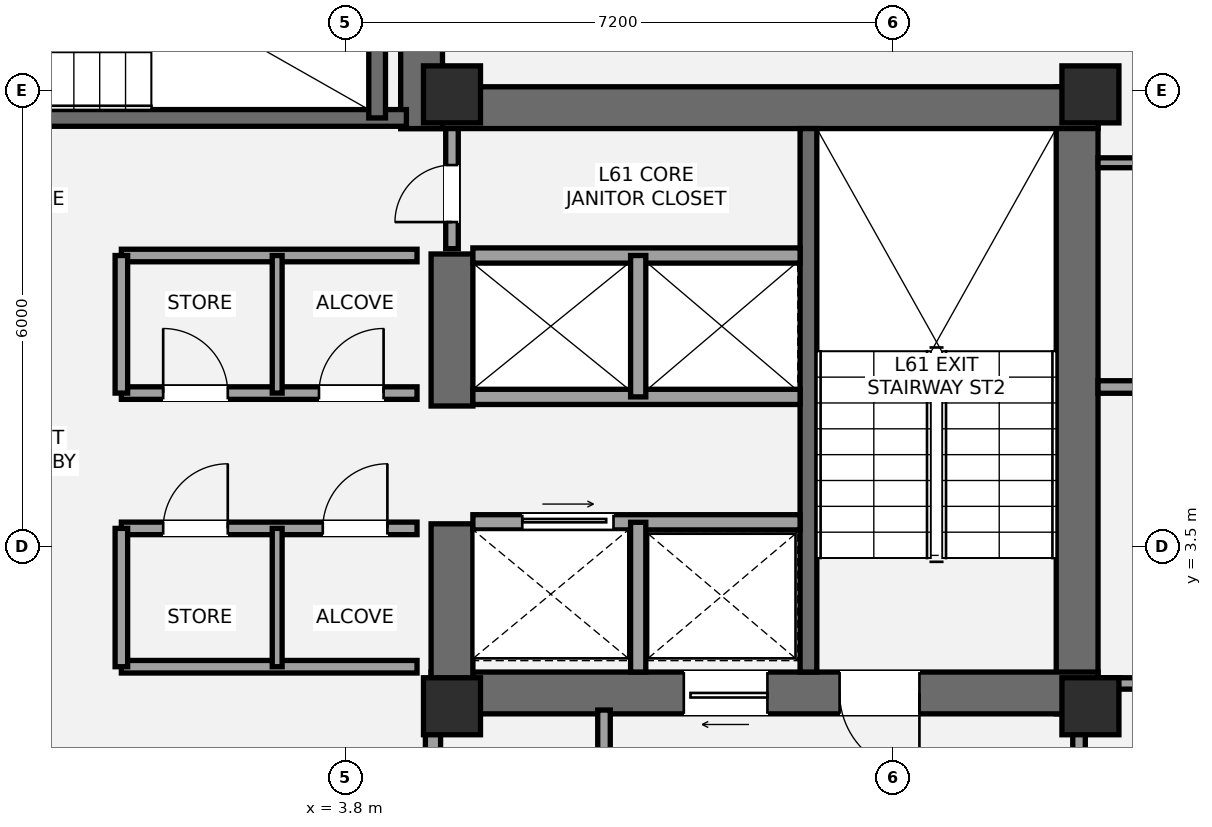
"""IFC4 building model, lengths in metres.
Left out: names, types, materials, properties, quantities, classifications, styles, units other than length and angle.
Written with IfcOpenShell. Run it as: python <this file> out.ifc"""

import sys

from ifc_helpers import new_model, si_unit, direction, frame, frame_2d, origin, origin_2d, place, context, subcontext, project, spatial, rectangle, extrude, element, fill, save


model = new_model("IFC4")
c1 = context("Model", 3, precision=1e-05, world=origin(), true_north=direction((0.0, 1.0)))
c2 = subcontext(c1, "Body", "Model", "MODEL_VIEW")
j1 = project(units=[si_unit("LENGTHUNIT", "METRE"), si_unit("PLANEANGLEUNIT", "RADIAN")], contexts=[c1])
p1 = place(None, origin())
s1 = spatial("IfcSite", under=j1, at=p1, CompositionType="ELEMENT")
p2 = place(p1, origin())
s2 = spatial("IfcBuilding", under=s1, at=p2, CompositionType="ELEMENT")
p3 = place(p2, frame((0.0, 0.0, 219.45)))
s3 = spatial("IfcBuildingStorey", under=s2, at=p3, CompositionType="ELEMENT", Elevation=219.45)
p4 = place(p3, frame((13.425, 1.3, 0.0), z_axis=(0.0, 0.0, 1.0), x_axis=(0.0, 1.0, 0.0)))
e1 = element("IfcWall", 1, at=p4, inside=s3, PredefinedType="SHEAR", context=c2, shape_type="SweptSolid", body=[
    extrude(rectangle(XDim=8.25, YDim=0.55, at=frame_2d((4.125, 0.0))), origin(), (0.0, 0.0, 1.0), 3.15),
])
p5 = place(p3, frame((4.525, 9.275, 0.0), z_axis=(0.0, 0.0, 1.0), x_axis=(1.0, 0.0, 0.0)))
e2 = element("IfcWall", 2, at=p5, inside=s3, PredefinedType="SHEAR", context=c2, shape_type="SweptSolid", body=[
    extrude(rectangle(XDim=9.175, YDim=0.55, at=frame_2d((4.587, 0.0))), origin(), (0.0, 0.0, 1.0), 3.15),
])
p6 = place(p3, frame((13.7, 1.575, 0.0), z_axis=(0.0, 0.0, 1.0), x_axis=(-1.0, 0.0, 0.0)))
e3 = element("IfcWall", 3, at=p6, inside=s3, PredefinedType="SHEAR", context=c2, shape_type="SweptSolid", body=[
    extrude(rectangle(XDim=8.775, YDim=0.55, at=frame_2d((4.387, 0.0))), origin(), (0.0, 0.0, 1.0), 3.15),
])
p7 = place(p6, frame((2.35, 0.0, 0.0)))
e4 = element("IfcOpeningElement", 4, at=p7, cuts=e3, PredefinedType="OPENING", context=c2, shape_type="SweptSolid", body=[
    extrude(rectangle(XDim=1.05, YDim=2.15, at=frame_2d((0.525, 1.075))), frame((0.0, 0.285, 0.0), z_axis=(0.0, -1.0, 0.0), x_axis=(1.0, 0.0, 0.0)), (0.0, 0.0, 1.0), 0.57),
])
p8 = place(p6, frame((4.35, 0.0, 0.0)))
e5 = element("IfcOpeningElement", 5, at=p8, cuts=e3, PredefinedType="OPENING", context=c2, shape_type="SweptSolid", body=[
    extrude(rectangle(XDim=1.1, YDim=2.2, at=frame_2d((0.55, 1.1))), frame((0.0, 0.285, 0.0), z_axis=(0.0, -1.0, 0.0), x_axis=(1.0, 0.0, 0.0)), (0.0, 0.0, 1.0), 0.57),
])
p9 = place(p3, frame((5.2, 1.3, 0.0), z_axis=(0.0, 0.0, 1.0), x_axis=(0.0, 1.0, 0.0)))
e6 = element("IfcWall", 6, at=p9, inside=s3, PredefinedType="SHEAR", context=c2, shape_type="SweptSolid", body=[
    extrude(rectangle(XDim=2.5, YDim=0.55, at=frame_2d((1.25, 0.0))), origin(), (0.0, 0.0, 1.0), 3.15),
])
p10 = place(p3, frame((5.2, 5.35, 0.0), z_axis=(0.0, 0.0, 1.0), x_axis=(0.0, 1.0, 0.0)))
e7 = element("IfcWall", 7, at=p10, inside=s3, PredefinedType="SHEAR", context=c2, shape_type="SweptSolid", body=[
    extrude(rectangle(XDim=2.0, YDim=0.55, at=frame_2d((1.0, 0.0))), origin(), (0.0, 0.0, 1.0), 3.15),
])
p11 = place(p3, frame((9.89, 1.85, 0.0), z_axis=(0.0, 0.0, 1.0), x_axis=(0.0, 1.0, 0.0)))
e8 = element("IfcWall", 8, at=p11, inside=s3, PredefinedType="SHEAR", context=c2, shape_type="SweptSolid", body=[
    extrude(rectangle(XDim=7.15, YDim=0.22, at=frame_2d((3.575, 0.0))), origin(), (0.0, 0.0, 1.0), 3.15),
])
p12 = place(p3, frame((4.8, 9.0, 0.0), z_axis=(0.0, 0.0, 1.0), x_axis=(0.0, 1.0, 0.0)))
e9 = element("IfcWall", 9, at=p12, inside=s3, PredefinedType="SHEAR", context=c2, shape_type="SweptSolid", body=[
    extrude(rectangle(XDim=3.95, YDim=0.55, at=frame_2d((1.975, 0.0))), origin(), (0.0, 0.0, 1.0), 3.15),
])
p13 = place(p3, frame((-4.7, 9.14, 0.0), z_axis=(0.0, 0.0, 1.0), x_axis=(1.0, 0.0, 0.0)))
e10 = element("IfcWall", 10, at=p13, inside=s3, PredefinedType="SHEAR", context=c2, shape_type="SweptSolid", body=[
    extrude(rectangle(XDim=9.3, YDim=0.22, at=frame_2d((4.65, 0.0))), origin(), (0.0, 0.0, 1.0), 3.15),
])
p14 = place(p13, frame((1.15, 0.0, 0.0)))
e11 = element("IfcOpeningElement", 11, at=p14, cuts=e10, PredefinedType="OPENING", context=c2, shape_type="SweptSolid", body=[
    extrude(rectangle(XDim=1.05, YDim=2.15, at=frame_2d((0.525, 1.075))), frame((0.0, 0.12, 0.0), z_axis=(0.0, -1.0, 0.0), x_axis=(1.0, 0.0, 0.0)), (0.0, 0.0, 1.0), 0.24),
])
p15 = place(p3, frame((4.215, 9.14, 0.0), z_axis=(0.0, 0.0, 1.0), x_axis=(0.0, 1.0, 0.0)))
e12 = element("IfcWall", 12, at=p15, inside=s3, PredefinedType="SHEAR", context=c2, shape_type="SweptSolid", body=[
    extrude(rectangle(XDim=3.26, YDim=0.22, at=frame_2d((1.63, 0.0))), origin(), (0.0, 0.0, 1.0), 3.15),
])
for number, where, z_axis, x_axis in (
    (13, (5.2, 1.4, 0.0), (0.0, 0.0, 1.0), (1.0, 0.0, 0.0)),
    (14, (5.2, 9.45, 0.0), (0.0, 0.0, 1.0), (1.0, 0.0, 0.0)),
    (15, (13.6, 1.4, 0.0), (0.0, 0.0, 1.0), (1.0, 0.0, 0.0)),
    (16, (13.6, 9.45, 0.0), (0.0, 0.0, 1.0), (1.0, 0.0, 0.0)),
):
    element("IfcColumn", number, at=place(p3, frame(where, z_axis=z_axis, x_axis=x_axis)), inside=s3, PredefinedType="PILASTER", context=c2, shape_type="SweptSolid", body=[
        extrude(rectangle(XDim=0.75, YDim=0.75, at=origin_2d()), origin(), (0.0, 0.0, 1.0), 3.15),
    ])
p16 = place(p3, frame((13.991, 11.482, 0.0), z_axis=(0.0, 0.0, 1.0), x_axis=(0.827609463482, -0.56130435234, 0.0)))
e17 = element("IfcWall", 17, at=p16, inside=s3, PredefinedType="STANDARD", context=c2, shape_type="SweptSolid", body=[
    extrude(rectangle(XDim=3.727, YDim=0.44, at=frame_2d((1.863, 0.0))), origin(), (0.0, 0.0, 1.0), 2.336),
])
p17 = place(p16, frame((2.626, 0.0, 0.42)))
e18 = element("IfcOpeningElement", 18, at=p17, cuts=e17, PredefinedType="OPENING", context=c2, shape_type="SweptSolid", body=[
    extrude(rectangle(XDim=0.9, YDim=1.35, at=frame_2d((0.45, 0.675))), frame((0.0, 0.23, 0.0), z_axis=(0.0, -1.0, 0.0), x_axis=(1.0, 0.0, 0.0)), (0.0, 0.0, 1.0), 0.46),
])
p18 = place(p3, frame((7.2, -2.15, 0.0), z_axis=(0.0, 0.0, 1.0), x_axis=(0.0, 1.0, 0.0)))
e19 = element("IfcWall", 19, at=p18, inside=s3, PredefinedType="PARTITIONING", context=c2, shape_type="SweptSolid", body=[
    extrude(rectangle(XDim=3.5, YDim=0.165, at=frame_2d((1.75, 0.0))), origin(), (0.0, 0.0, 1.0), 2.423),
])
p19 = place(p3, frame((13.45, -2.15, 0.0), z_axis=(0.0, 0.0, 1.0), x_axis=(0.0, 1.0, 0.0)))
e20 = element("IfcWall", 20, at=p19, inside=s3, PredefinedType="PARTITIONING", context=c2, shape_type="SweptSolid", body=[
    extrude(rectangle(XDim=3.5, YDim=0.165, at=frame_2d((1.75, 0.0))), origin(), (0.0, 0.0, 1.0), 2.423),
])
p20 = place(p19, frame((0.67, 0.0, 0.0)))
e21 = element("IfcOpeningElement", 21, at=p20, cuts=e20, PredefinedType="OPENING", context=c2, shape_type="SweptSolid", body=[
    extrude(rectangle(XDim=1.05, YDim=2.15, at=frame_2d((0.525, 1.075))), frame((0.0, 0.093, 0.0), z_axis=(0.0, -1.0, 0.0), x_axis=(1.0, 0.0, 0.0)), (0.0, 0.0, 1.0), 0.185),
])
p21 = place(p3, frame((4.95, -2.15, 0.0), z_axis=(0.0, 0.0, 1.0), x_axis=(0.0, 1.0, 0.0)))
e22 = element("IfcWall", 22, at=p21, inside=s3, PredefinedType="SOLIDWALL", context=c2, shape_type="SweptSolid", body=[
    extrude(rectangle(XDim=3.5, YDim=0.2, at=frame_2d((1.75, 0.0))), origin(), (0.0, 0.0, 1.0), 2.423),
])
p22 = place(p21, frame((0.95, 0.0, 0.0)))
e23 = element("IfcOpeningElement", 23, at=p22, cuts=e22, PredefinedType="OPENING", context=c2, shape_type="SweptSolid", body=[
    extrude(rectangle(XDim=0.75, YDim=2.1, at=frame_2d((0.375, 1.05))), frame((0.0, 0.11, 0.0), z_axis=(0.0, -1.0, 0.0), x_axis=(1.0, 0.0, 0.0)), (0.0, 0.0, 1.0), 0.22),
])
p23 = place(p3, frame((5.475, 3.82, 0.0), z_axis=(0.0, 0.0, 1.0), x_axis=(1.0, 0.0, 0.0)))
e24 = element("IfcWall", 24, at=p23, inside=s3, PredefinedType="SOLIDWALL", context=c2, shape_type="SweptSolid", body=[
    extrude(rectangle(XDim=4.305, YDim=0.2, at=frame_2d((2.152, 0.0))), origin(), (0.0, 0.0, 1.0), 2.97),
])
p24 = place(p23, frame((0.65, 0.0, 0.0)))
e25 = element("IfcOpeningElement", 25, at=p24, cuts=e24, PredefinedType="OPENING", context=c2, shape_type="SweptSolid", body=[
    extrude(rectangle(XDim=1.2, YDim=2.2, at=frame_2d((0.6, 1.1))), frame((0.0, 0.11, 0.0), z_axis=(0.0, -1.0, 0.0), x_axis=(1.0, 0.0, 0.0)), (0.0, 0.0, 1.0), 0.22),
])
p25 = place(p3, frame((7.65, 1.85, 0.0), z_axis=(0.0, 0.0, 1.0), x_axis=(0.0, 1.0, 0.0)))
e26 = element("IfcWall", 26, at=p25, inside=s3, PredefinedType="SOLIDWALL", context=c2, shape_type="SweptSolid", body=[
    extrude(rectangle(XDim=1.97, YDim=0.2, at=frame_2d((0.985, 0.0))), origin(), (0.0, 0.0, 1.0), 2.97),
])
for number, where, z_axis, x_axis in (
    (27, (5.475, 5.47, 0.0), (0.0, 0.0, 1.0), (1.0, 0.0, 0.0)),
    (28, (5.475, 7.33, 0.0), (0.0, 0.0, 1.0), (1.0, 0.0, 0.0)),
):
    element("IfcWall", number, at=place(p3, frame(where, z_axis=z_axis, x_axis=x_axis)), inside=s3, PredefinedType="SOLIDWALL", context=c2, shape_type="SweptSolid", body=[
        extrude(rectangle(XDim=4.305, YDim=0.2, at=frame_2d((2.152, 0.0))), origin(), (0.0, 0.0, 1.0), 2.97),
    ])
p26 = place(p3, frame((7.65, 5.47, 0.0), z_axis=(0.0, 0.0, 1.0), x_axis=(0.0, 1.0, 0.0)))
e29 = element("IfcWall", 29, at=p26, inside=s3, PredefinedType="SOLIDWALL", context=c2, shape_type="SweptSolid", body=[
    extrude(rectangle(XDim=1.86, YDim=0.2, at=frame_2d((0.93, 0.0))), origin(), (0.0, 0.0, 1.0), 2.97),
])
p27 = place(p3, frame((0.85, 1.92, 0.0), z_axis=(0.0, 0.0, 1.0), x_axis=(1.0, 0.0, 0.0)))
e30 = element("IfcWall", 30, at=p27, inside=s3, PredefinedType="PARTITIONING", context=c2, shape_type="SweptSolid", body=[
    extrude(rectangle(XDim=3.89, YDim=0.165, at=frame_2d((1.945, 0.0))), origin(), (0.0, 0.0, 1.0), 2.11),
])
p28 = place(p3, frame((0.85, 3.74, 0.0), z_axis=(0.0, 0.0, 1.0), x_axis=(1.0, 0.0, 0.0)))
e31 = element("IfcWall", 31, at=p28, inside=s3, PredefinedType="PARTITIONING", context=c2, shape_type="SweptSolid", body=[
    extrude(rectangle(XDim=3.89, YDim=0.165, at=frame_2d((1.945, 0.0))), origin(), (0.0, 0.0, 1.0), 2.97),
])
p29 = place(p28, frame((0.55, 0.0, 0.0)))
e32 = element("IfcOpeningElement", 32, at=p29, cuts=e31, PredefinedType="OPENING", context=c2, shape_type="SweptSolid", body=[
    extrude(rectangle(XDim=0.85, YDim=2.1, at=frame_2d((0.425, 1.05))), frame((0.0, 0.093, 0.0), z_axis=(0.0, -1.0, 0.0), x_axis=(1.0, 0.0, 0.0)), (0.0, 0.0, 1.0), 0.185),
])
p30 = place(p28, frame((2.65, 0.0, 0.0)))
e33 = element("IfcOpeningElement", 33, at=p30, cuts=e31, PredefinedType="OPENING", context=c2, shape_type="SweptSolid", body=[
    extrude(rectangle(XDim=0.85, YDim=2.1, at=frame_2d((0.425, 1.05))), frame((0.0, 0.093, 0.0), z_axis=(0.0, -1.0, 0.0), x_axis=(1.0, 0.0, 0.0)), (0.0, 0.0, 1.0), 0.185),
])
p31 = place(p3, frame((0.85, 1.92, 0.0), z_axis=(0.0, 0.0, 1.0), x_axis=(0.0, 1.0, 0.0)))
e34 = element("IfcWall", 34, at=p31, inside=s3, PredefinedType="PARTITIONING", context=c2, shape_type="SweptSolid", body=[
    extrude(rectangle(XDim=1.82, YDim=0.165, at=frame_2d((0.91, 0.0))), origin(), (0.0, 0.0, 1.0), 2.97),
])
p32 = place(p3, frame((2.9, 1.92, 0.0), z_axis=(0.0, 0.0, 1.0), x_axis=(0.0, 1.0, 0.0)))
e35 = element("IfcWall", 35, at=p32, inside=s3, PredefinedType="PARTITIONING", context=c2, shape_type="SweptSolid", body=[
    extrude(rectangle(XDim=1.82, YDim=0.13, at=frame_2d((0.91, 0.0))), origin(), (0.0, 0.0, 1.0), 2.97),
])
p33 = place(p3, frame((0.85, 5.52, 0.0), z_axis=(0.0, 0.0, 1.0), x_axis=(1.0, 0.0, 0.0)))
e36 = element("IfcWall", 36, at=p33, inside=s3, PredefinedType="PARTITIONING", context=c2, shape_type="SweptSolid", body=[
    extrude(rectangle(XDim=3.89, YDim=0.165, at=frame_2d((1.945, 0.0))), origin(), (0.0, 0.0, 1.0), 2.97),
])
p34 = place(p33, frame((0.55, 0.0, 0.0)))
e37 = element("IfcOpeningElement", 37, at=p34, cuts=e36, PredefinedType="OPENING", context=c2, shape_type="SweptSolid", body=[
    extrude(rectangle(XDim=0.85, YDim=2.1, at=frame_2d((0.425, 1.05))), frame((0.0, 0.093, 0.0), z_axis=(0.0, -1.0, 0.0), x_axis=(1.0, 0.0, 0.0)), (0.0, 0.0, 1.0), 0.185),
])
p35 = place(p33, frame((2.6, 0.0, 0.0)))
e38 = element("IfcOpeningElement", 38, at=p35, cuts=e36, PredefinedType="OPENING", context=c2, shape_type="SweptSolid", body=[
    extrude(rectangle(XDim=0.85, YDim=2.1, at=frame_2d((0.425, 1.05))), frame((0.0, 0.093, 0.0), z_axis=(0.0, -1.0, 0.0), x_axis=(1.0, 0.0, 0.0)), (0.0, 0.0, 1.0), 0.185),
])
p36 = place(p3, frame((0.85, 7.33, 0.0), z_axis=(0.0, 0.0, 1.0), x_axis=(1.0, 0.0, 0.0)))
e39 = element("IfcWall", 39, at=p36, inside=s3, PredefinedType="PARTITIONING", context=c2, shape_type="SweptSolid", body=[
    extrude(rectangle(XDim=3.89, YDim=0.165, at=frame_2d((1.945, 0.0))), origin(), (0.0, 0.0, 1.0), 2.97),
])
p37 = place(p3, frame((0.85, 5.52, 0.0), z_axis=(0.0, 0.0, 1.0), x_axis=(0.0, 1.0, 0.0)))
e40 = element("IfcWall", 40, at=p37, inside=s3, PredefinedType="PARTITIONING", context=c2, shape_type="SweptSolid", body=[
    extrude(rectangle(XDim=1.81, YDim=0.165, at=frame_2d((0.905, 0.0))), origin(), (0.0, 0.0, 1.0), 2.97),
])
p38 = place(p3, frame((2.9, 5.52, 0.0), z_axis=(0.0, 0.0, 1.0), x_axis=(0.0, 1.0, 0.0)))
e41 = element("IfcWall", 41, at=p38, inside=s3, PredefinedType="PARTITIONING", context=c2, shape_type="SweptSolid", body=[
    extrude(rectangle(XDim=1.81, YDim=0.13, at=frame_2d((0.905, 0.0))), origin(), (0.0, 0.0, 1.0), 2.97),
])
p39 = place(p3, frame((5.2, 7.42, 0.0), z_axis=(0.0, 0.0, 1.0), x_axis=(0.0, 1.0, 0.0)))
e42 = element("IfcWall", 42, at=p39, inside=s3, PredefinedType="PARTITIONING", context=c2, shape_type="SweptSolid", body=[
    extrude(rectangle(XDim=1.58, YDim=0.165, at=frame_2d((0.79, 0.0))), origin(), (0.0, 0.0, 1.0), 2.97),
])
p40 = place(p39, frame((0.35, 0.0, 0.0)))
e43 = element("IfcOpeningElement", 43, at=p40, cuts=e42, PredefinedType="OPENING", context=c2, shape_type="SweptSolid", body=[
    extrude(rectangle(XDim=0.75, YDim=2.1, at=frame_2d((0.375, 1.05))), frame((0.0, 0.093, 0.0), z_axis=(0.0, -1.0, 0.0), x_axis=(1.0, 0.0, 0.0)), (0.0, 0.0, 1.0), 0.185),
])
p41 = place(p3, frame((13.7, 5.6, 0.0), z_axis=(0.0, 0.0, 1.0), x_axis=(1.0, 0.0, 0.0)))
e44 = element("IfcWall", 44, at=p41, inside=s3, PredefinedType="PARTITIONING", context=c2, shape_type="SweptSolid", body=[
    extrude(rectangle(XDim=6.874, YDim=0.165, at=frame_2d((3.437, 0.0))), origin(), (0.0, 0.0, 1.0), 2.423),
])
p42 = place(p41, frame((3.458, 0.0, 0.0)))
e45 = element("IfcOpeningElement", 45, at=p42, cuts=e44, PredefinedType="OPENING", context=c2, shape_type="SweptSolid", body=[
    extrude(rectangle(XDim=0.85, YDim=2.1, at=frame_2d((0.425, 1.05))), frame((0.0, 0.093, 0.0), z_axis=(0.0, -1.0, 0.0), x_axis=(1.0, 0.0, 0.0)), (0.0, 0.0, 1.0), 0.185),
])
p43 = place(p3, frame((13.7, 1.7, 0.0), z_axis=(0.0, 0.0, 1.0), x_axis=(1.0, 0.0, 0.0)))
e46 = element("IfcWall", 46, at=p43, inside=s3, PredefinedType="PLUMBINGWALL", context=c2, shape_type="SweptSolid", body=[
    extrude(rectangle(XDim=4.25, YDim=0.15, at=frame_2d((2.125, 0.0))), origin(), (0.0, 0.0, 1.0), 2.423),
])
p44 = place(p43, frame((0.55, 0.0, 0.0)))
e47 = element("IfcOpeningElement", 47, at=p44, cuts=e46, PredefinedType="OPENING", context=c2, shape_type="SweptSolid", body=[
    extrude(rectangle(XDim=0.8, YDim=2.1, at=frame_2d((0.4, 1.05))), frame((0.0, 0.085, 0.0), z_axis=(0.0, -1.0, 0.0), x_axis=(1.0, 0.0, 0.0)), (0.0, 0.0, 1.0), 0.17),
])
p45 = place(p43, frame((2.15, 0.0, 0.0)))
e48 = element("IfcOpeningElement", 48, at=p45, cuts=e46, PredefinedType="OPENING", context=c2, shape_type="SweptSolid", body=[
    extrude(rectangle(XDim=0.85, YDim=2.1, at=frame_2d((0.425, 1.05))), frame((0.0, 0.085, 0.0), z_axis=(0.0, -1.0, 0.0), x_axis=(1.0, 0.0, 0.0)), (0.0, 0.0, 1.0), 0.17),
])
p46 = place(p3, frame((13.7, 8.55, 0.0), z_axis=(0.0, 0.0, 1.0), x_axis=(1.0, 0.0, 0.0)))
e49 = element("IfcWall", 49, at=p46, inside=s3, PredefinedType="PARTITIONING", context=c2, shape_type="SweptSolid", body=[
    extrude(rectangle(XDim=3.988, YDim=0.13, at=frame_2d((1.994, 0.0))), origin(), (0.0, 0.0, 1.0), 2.423),
])
p47 = place(p46, frame((1.986, 0.0, 0.0)))
e50 = element("IfcOpeningElement", 50, at=p47, cuts=e49, PredefinedType="OPENING", context=c2, shape_type="SweptSolid", body=[
    extrude(rectangle(XDim=0.85, YDim=2.1, at=frame_2d((0.425, 1.05))), frame((0.0, 0.075, 0.0), z_axis=(0.0, -1.0, 0.0), x_axis=(1.0, 0.0, 0.0)), (0.0, 0.0, 1.0), 0.15),
])
p48 = place(p7, origin())
e51 = element("IfcDoor", 51, at=p48, inside=s3, OperationType="SINGLE_SWING_LEFT", PredefinedType="DOOR", context=c2, shape_type="SweptSolid", body=[
    extrude(rectangle(XDim=1.05, YDim=2.15, at=frame_2d((0.525, 1.075))), frame((0.0, 0.025, 0.0), z_axis=(0.0, -1.0, 0.0), x_axis=(1.0, 0.0, 0.0)), (0.0, 0.0, 1.0), 0.05),
])
fill(e4, e51)
p49 = place(p8, origin())
e52 = element("IfcDoor", 52, at=p49, inside=s3, OperationType="SLIDING_TO_LEFT", PredefinedType="DOOR", context=c2, shape_type="SweptSolid", body=[
    extrude(rectangle(XDim=1.1, YDim=2.2, at=frame_2d((0.55, 1.1))), frame((0.0, 0.025, 0.0), z_axis=(0.0, -1.0, 0.0), x_axis=(1.0, 0.0, 0.0)), (0.0, 0.0, 1.0), 0.05),
])
fill(e5, e52)
p50 = place(p24, origin())
e53 = element("IfcDoor", 53, at=p50, inside=s3, OperationType="SLIDING_TO_RIGHT", PredefinedType="DOOR", context=c2, shape_type="SweptSolid", body=[
    extrude(rectangle(XDim=1.2, YDim=2.2, at=frame_2d((0.6, 1.1))), frame((0.0, 0.025, 0.0), z_axis=(0.0, -1.0, 0.0), x_axis=(1.0, 0.0, 0.0)), (0.0, 0.0, 1.0), 0.05),
])
fill(e25, e53)
p51 = place(p29, origin())
e54 = element("IfcDoor", 54, at=p51, inside=s3, OperationType="SINGLE_SWING_RIGHT", PredefinedType="DOOR", context=c2, shape_type="SweptSolid", body=[
    extrude(rectangle(XDim=0.85, YDim=2.1, at=frame_2d((0.425, 1.05))), frame((0.0, 0.025, 0.0), z_axis=(0.0, -1.0, 0.0), x_axis=(1.0, 0.0, 0.0)), (0.0, 0.0, 1.0), 0.05),
])
fill(e32, e54)
p52 = place(p30, origin())
e55 = element("IfcDoor", 55, at=p52, inside=s3, OperationType="SINGLE_SWING_RIGHT", PredefinedType="DOOR", context=c2, shape_type="SweptSolid", body=[
    extrude(rectangle(XDim=0.85, YDim=2.1, at=frame_2d((0.425, 1.05))), frame((0.0, 0.025, 0.0), z_axis=(0.0, -1.0, 0.0), x_axis=(1.0, 0.0, 0.0)), (0.0, 0.0, 1.0), 0.05),
])
fill(e33, e55)
p53 = place(p34, origin())
e56 = element("IfcDoor", 56, at=p53, inside=s3, OperationType="SINGLE_SWING_LEFT", PredefinedType="DOOR", context=c2, shape_type="SweptSolid", body=[
    extrude(rectangle(XDim=0.85, YDim=2.1, at=frame_2d((0.425, 1.05))), frame((0.0, 0.025, 0.0), z_axis=(0.0, -1.0, 0.0), x_axis=(1.0, 0.0, 0.0)), (0.0, 0.0, 1.0), 0.05),
])
fill(e37, e56)
p54 = place(p35, origin())
e57 = element("IfcDoor", 57, at=p54, inside=s3, OperationType="SINGLE_SWING_RIGHT", PredefinedType="DOOR", context=c2, shape_type="SweptSolid", body=[
    extrude(rectangle(XDim=0.85, YDim=2.1, at=frame_2d((0.425, 1.05))), frame((0.0, 0.025, 0.0), z_axis=(0.0, -1.0, 0.0), x_axis=(1.0, 0.0, 0.0)), (0.0, 0.0, 1.0), 0.05),
])
fill(e38, e57)
p55 = place(p40, origin())
e58 = element("IfcDoor", 58, at=p55, inside=s3, OperationType="SINGLE_SWING_LEFT", PredefinedType="DOOR", context=c2, shape_type="SweptSolid", body=[
    extrude(rectangle(XDim=0.75, YDim=2.1, at=frame_2d((0.375, 1.05))), frame((0.0, 0.025, 0.0), z_axis=(0.0, -1.0, 0.0), x_axis=(1.0, 0.0, 0.0)), (0.0, 0.0, 1.0), 0.05),
])
fill(e43, e58)
save(model, sys.argv[1])
